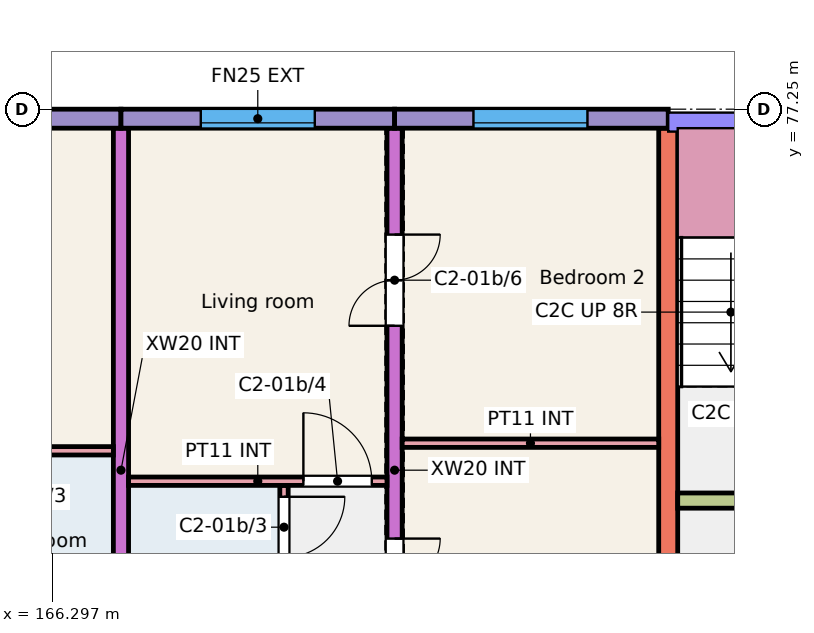
"""IFC4 building model, lengths in metres.
Left out: names, types, materials, properties, quantities, classifications, styles, units other than length and angle.
Written with IfcOpenShell. Run it as: python <this file> out.ifc"""

import sys

from ifc_helpers import new_model, si_unit, direction, frame, frame_2d, origin, place, context, subcontext, project, spatial, rectangle, extrude, element, fill, save


model = new_model("IFC4")
c1 = context("Model", 3, precision=1e-05, world=origin(), true_north=direction((0.0, 1.0)))
c2 = subcontext(c1, "Body", "Model", "MODEL_VIEW")
j1 = project(units=[si_unit("LENGTHUNIT", "METRE"), si_unit("PLANEANGLEUNIT", "RADIAN")], contexts=[c1])
p1 = place(None, origin())
s1 = spatial("IfcSite", under=j1, at=p1, CompositionType="ELEMENT")
p2 = place(p1, origin())
s2 = spatial("IfcBuilding", under=s1, at=p2, CompositionType="ELEMENT")
p3 = place(p2, frame((0.0, 0.0, 3.0)))
s3 = spatial("IfcBuildingStorey", under=s2, at=p3, CompositionType="ELEMENT", Elevation=3.0)
p4 = place(p3, frame((167.2, 68.0, 0.0), z_axis=(0.0, 0.0, 1.0), x_axis=(0.0, 1.0, 0.0)))
e1 = element("IfcWall", 1, at=p4, inside=s3, PredefinedType="SHEAR", context=c2, shape_type="SweptSolid", body=[
    extrude(rectangle(XDim=9.0, YDim=0.2, at=frame_2d((4.5, 0.0))), origin(), (0.0, 0.0, 1.0), 3.0),
])
p5 = place(p3, frame((170.8, 68.0, 0.0), z_axis=(0.0, 0.0, 1.0), x_axis=(0.0, 1.0, 0.0)))
e2 = element("IfcWall", 2, at=p5, inside=s3, PredefinedType="SHEAR", context=c2, shape_type="SweptSolid", body=[
    extrude(rectangle(XDim=9.0, YDim=0.2, at=frame_2d((4.5, 0.0))), origin(), (0.0, 0.0, 1.0), 3.0),
])
p6 = place(p5, frame((2.4, 0.0, 0.0)))
e3 = element("IfcOpeningElement", 3, at=p6, cuts=e2, PredefinedType="OPENING", context=c2, shape_type="SweptSolid", body=[
    extrude(rectangle(XDim=1.2, YDim=2.1, at=frame_2d((0.6, 1.05))), frame((0.0, 0.11, 0.0), z_axis=(0.0, -1.0, 0.0), x_axis=(1.0, 0.0, 0.0)), (0.0, 0.0, 1.0), 0.22),
])
p7 = place(p5, frame((6.4, 0.0, 0.0)))
e4 = element("IfcOpeningElement", 4, at=p7, cuts=e2, PredefinedType="OPENING", context=c2, shape_type="SweptSolid", body=[
    extrude(rectangle(XDim=1.2, YDim=2.1, at=frame_2d((0.6, 1.05))), frame((0.0, 0.11, 0.0), z_axis=(0.0, -1.0, 0.0), x_axis=(1.0, 0.0, 0.0)), (0.0, 0.0, 1.0), 0.22),
])
p8 = place(p3, frame((174.4, 68.0, 0.0), z_axis=(0.0, 0.0, 1.0), x_axis=(0.0, 1.0, 0.0)))
e5 = element("IfcWall", 5, at=p8, inside=s3, PredefinedType="SHEAR", context=c2, shape_type="SweptSolid", body=[
    extrude(rectangle(XDim=9.0, YDim=0.25, at=frame_2d((4.5, 0.0))), origin(), (0.0, 0.0, 1.0), 3.0),
])
p9 = place(p3, frame((163.6, 77.125, 0.0), z_axis=(0.0, 0.0, 1.0), x_axis=(1.0, 0.0, 0.0)))
e6 = element("IfcWall", 6, at=p9, inside=s3, PredefinedType="SOLIDWALL", context=c2, shape_type="SweptSolid", body=[
    extrude(rectangle(XDim=3.6, YDim=0.25, at=frame_2d((1.8, 0.0))), origin(), (0.0, 0.0, 1.0), 3.0),
])
p10 = place(p9, frame((1.075, 0.0, 0.9)))
e7 = element("IfcOpeningElement", 7, at=p10, cuts=e6, PredefinedType="OPENING", context=c2, shape_type="SweptSolid", body=[
    extrude(rectangle(XDim=1.5, YDim=1.5, at=frame_2d((0.75, 0.75))), frame((0.0, 0.135, 0.0), z_axis=(0.0, -1.0, 0.0), x_axis=(1.0, 0.0, 0.0)), (0.0, 0.0, 1.0), 0.27),
])
p11 = place(p3, frame((167.2, 77.125, 0.0), z_axis=(0.0, 0.0, 1.0), x_axis=(1.0, 0.0, 0.0)))
e8 = element("IfcWall", 8, at=p11, inside=s3, PredefinedType="SOLIDWALL", context=c2, shape_type="SweptSolid", body=[
    extrude(rectangle(XDim=3.6, YDim=0.25, at=frame_2d((1.8, 0.0))), origin(), (0.0, 0.0, 1.0), 3.0),
])
p12 = place(p11, frame((1.05, 0.0, 0.9)))
e9 = element("IfcOpeningElement", 9, at=p12, cuts=e8, PredefinedType="OPENING", context=c2, shape_type="SweptSolid", body=[
    extrude(rectangle(XDim=1.5, YDim=1.5, at=frame_2d((0.75, 0.75))), frame((0.0, 0.135, 0.0), z_axis=(0.0, -1.0, 0.0), x_axis=(1.0, 0.0, 0.0)), (0.0, 0.0, 1.0), 0.27),
])
p13 = place(p3, frame((170.8, 77.125, 0.0), z_axis=(0.0, 0.0, 1.0), x_axis=(1.0, 0.0, 0.0)))
e10 = element("IfcWall", 10, at=p13, inside=s3, PredefinedType="SOLIDWALL", context=c2, shape_type="SweptSolid", body=[
    extrude(rectangle(XDim=3.6, YDim=0.25, at=frame_2d((1.8, 0.0))), origin(), (0.0, 0.0, 1.0), 3.0),
])
p14 = place(p13, frame((1.038, 0.0, 0.9)))
e11 = element("IfcOpeningElement", 11, at=p14, cuts=e10, PredefinedType="OPENING", context=c2, shape_type="SweptSolid", body=[
    extrude(rectangle(XDim=1.5, YDim=1.5, at=frame_2d((0.75, 0.75))), frame((0.0, 0.135, 0.0), z_axis=(0.0, -1.0, 0.0), x_axis=(1.0, 0.0, 0.0)), (0.0, 0.0, 1.0), 0.27),
])
p15 = place(p3, frame((174.525, 72.1, 0.0), z_axis=(0.0, 0.0, 1.0), x_axis=(1.0, 0.0, 0.0)))
e12 = element("IfcWall", 12, at=p15, inside=s3, PredefinedType="SHEAR", context=c2, shape_type="SweptSolid", body=[
    extrude(rectangle(XDim=5.725, YDim=0.2, at=frame_2d((2.863, 0.0))), origin(), (0.0, 0.0, 1.0), 3.0),
])
p16 = place(p15, frame((0.95, 0.0, 0.0)))
e13 = element("IfcOpeningElement", 13, at=p16, cuts=e12, PredefinedType="OPENING", context=c2, shape_type="SweptSolid", body=[
    extrude(rectangle(XDim=1.0, YDim=2.1, at=frame_2d((0.5, 1.05))), frame((0.0, 0.11, 0.0), z_axis=(0.0, -1.0, 0.0), x_axis=(1.0, 0.0, 0.0)), (0.0, 0.0, 1.0), 0.22),
])
p17 = place(p15, frame((3.863, 0.0, 0.0)))
e14 = element("IfcOpeningElement", 14, at=p17, cuts=e12, PredefinedType="OPENING", context=c2, shape_type="SweptSolid", body=[
    extrude(rectangle(XDim=1.1, YDim=2.1, at=frame_2d((0.55, 1.05))), frame((0.0, 0.11, 0.0), z_axis=(0.0, -1.0, 0.0), x_axis=(1.0, 0.0, 0.0)), (0.0, 0.0, 1.0), 0.22),
])
p18 = place(p3, frame((163.75, 72.755, 0.0), z_axis=(0.0, 0.0, 1.0), x_axis=(1.0, 0.0, 0.0)))
e15 = element("IfcWall", 15, at=p18, inside=s3, PredefinedType="PARTITIONING", context=c2, shape_type="SweptSolid", body=[
    extrude(rectangle(XDim=3.35, YDim=0.11, at=frame_2d((1.675, 0.0))), origin(), (0.0, 0.0, 1.0), 2.8),
])
p19 = place(p18, frame((0.2, 0.0, 0.0)))
e16 = element("IfcOpeningElement", 16, at=p19, cuts=e15, PredefinedType="OPENING", context=c2, shape_type="SweptSolid", body=[
    extrude(rectangle(XDim=0.9, YDim=2.1, at=frame_2d((0.45, 1.05))), frame((0.0, 0.065, 0.0), z_axis=(0.0, -1.0, 0.0), x_axis=(1.0, 0.0, 0.0)), (0.0, 0.0, 1.0), 0.13),
])
p20 = place(p3, frame((169.345, 68.0, 0.0), z_axis=(0.0, 0.0, 1.0), x_axis=(0.0, 1.0, 0.0)))
e17 = element("IfcWall", 17, at=p20, inside=s3, PredefinedType="PARTITIONING", context=c2, shape_type="SweptSolid", body=[
    extrude(rectangle(XDim=4.3, YDim=0.11, at=frame_2d((2.15, 0.0))), origin(), (0.0, 0.0, 1.0), 2.8),
])
p21 = place(p20, frame((0.2, 0.0, 0.0)))
e18 = element("IfcOpeningElement", 18, at=p21, cuts=e17, PredefinedType="OPENING", context=c2, shape_type="SweptSolid", body=[
    extrude(rectangle(XDim=0.8, YDim=2.1, at=frame_2d((0.4, 1.05))), frame((0.0, 0.065, 0.0), z_axis=(0.0, -1.0, 0.0), x_axis=(1.0, 0.0, 0.0)), (0.0, 0.0, 1.0), 0.13),
])
p22 = place(p20, frame((3.35, 0.0, 0.0)))
e19 = element("IfcOpeningElement", 19, at=p22, cuts=e17, PredefinedType="OPENING", context=c2, shape_type="SweptSolid", body=[
    extrude(rectangle(XDim=0.8, YDim=2.1, at=frame_2d((0.4, 1.05))), frame((0.0, 0.065, 0.0), z_axis=(0.0, -1.0, 0.0), x_axis=(1.0, 0.0, 0.0)), (0.0, 0.0, 1.0), 0.13),
])
p23 = place(p3, frame((167.3, 72.355, 0.0), z_axis=(0.0, 0.0, 1.0), x_axis=(1.0, 0.0, 0.0)))
e20 = element("IfcWall", 20, at=p23, inside=s3, PredefinedType="PARTITIONING", context=c2, shape_type="SweptSolid", body=[
    extrude(rectangle(XDim=3.4, YDim=0.11, at=frame_2d((1.7, 0.0))), origin(), (0.0, 0.0, 1.0), 2.8),
])
p24 = place(p23, frame((2.3, 0.0, 0.0)))
e21 = element("IfcOpeningElement", 21, at=p24, cuts=e20, PredefinedType="OPENING", context=c2, shape_type="SweptSolid", body=[
    extrude(rectangle(XDim=0.9, YDim=2.1, at=frame_2d((0.45, 1.05))), frame((0.0, 0.065, 0.0), z_axis=(0.0, -1.0, 0.0), x_axis=(1.0, 0.0, 0.0)), (0.0, 0.0, 1.0), 0.13),
])
p25 = place(p3, frame((170.9, 72.855, 0.0), z_axis=(0.0, 0.0, 1.0), x_axis=(1.0, 0.0, 0.0)))
e22 = element("IfcWall", 22, at=p25, inside=s3, PredefinedType="PARTITIONING", context=c2, shape_type="SweptSolid", body=[
    extrude(rectangle(XDim=3.375, YDim=0.11, at=frame_2d((1.688, 0.0))), origin(), (0.0, 0.0, 1.0), 2.8),
])
p26 = place(p14, origin())
e23 = element("IfcWindow", 23, at=p26, inside=s3, PartitioningType="SINGLE_PANEL", PredefinedType="WINDOW", context=c2, shape_type="SweptSolid", body=[
    extrude(rectangle(XDim=1.5, YDim=1.5, at=frame_2d((0.75, 0.75))), frame((0.0, -0.025, 0.0), z_axis=(0.0, -1.0, 0.0), x_axis=(1.0, 0.0, 0.0)), (0.0, 0.0, 1.0), 0.06),
])
fill(e11, e23)
p27 = place(p12, origin())
e24 = element("IfcWindow", 24, at=p27, inside=s3, PartitioningType="SINGLE_PANEL", PredefinedType="WINDOW", context=c2, shape_type="SweptSolid", body=[
    extrude(rectangle(XDim=1.5, YDim=1.5, at=frame_2d((0.75, 0.75))), frame((0.0, -0.025, 0.0), z_axis=(0.0, -1.0, 0.0), x_axis=(1.0, 0.0, 0.0)), (0.0, 0.0, 1.0), 0.06),
])
fill(e9, e24)
p28 = place(p22, origin())
e25 = element("IfcDoor", 25, at=p28, inside=s3, OperationType="SINGLE_SWING_RIGHT", PredefinedType="DOOR", context=c2, shape_type="SweptSolid", body=[
    extrude(rectangle(XDim=0.8, YDim=2.1, at=frame_2d((0.4, 1.05))), frame((0.0, 0.025, 0.0), z_axis=(0.0, -1.0, 0.0), x_axis=(1.0, 0.0, 0.0)), (0.0, 0.0, 1.0), 0.05),
])
fill(e19, e25)
p29 = place(p24, origin())
e26 = element("IfcDoor", 26, at=p29, inside=s3, OperationType="SINGLE_SWING_LEFT", PredefinedType="DOOR", context=c2, shape_type="SweptSolid", body=[
    extrude(rectangle(XDim=0.9, YDim=2.1, at=frame_2d((0.45, 1.05))), frame((0.0, 0.025, 0.0), z_axis=(0.0, -1.0, 0.0), x_axis=(1.0, 0.0, 0.0)), (0.0, 0.0, 1.0), 0.05),
])
fill(e21, e26)
p30 = place(p6, origin())
e27 = element("IfcDoor", 27, at=p30, inside=s3, OperationType="DOUBLE_DOOR_SINGLE_SWING", PredefinedType="DOOR", context=c2, shape_type="SweptSolid", body=[
    extrude(rectangle(XDim=1.2, YDim=2.1, at=frame_2d((0.6, 1.05))), frame((0.0, 0.025, 0.0), z_axis=(0.0, -1.0, 0.0), x_axis=(1.0, 0.0, 0.0)), (0.0, 0.0, 1.0), 0.05),
])
fill(e3, e27)
p31 = place(p7, origin())
e28 = element("IfcDoor", 28, at=p31, inside=s3, OperationType="DOUBLE_DOOR_SINGLE_SWING", PredefinedType="DOOR", context=c2, shape_type="SweptSolid", body=[
    extrude(rectangle(XDim=1.2, YDim=2.1, at=frame_2d((0.6, 1.05))), frame((0.0, 0.025, 0.0), z_axis=(0.0, -1.0, 0.0), x_axis=(1.0, 0.0, 0.0)), (0.0, 0.0, 1.0), 0.05),
])
fill(e4, e28)
save(model, sys.argv[1])
